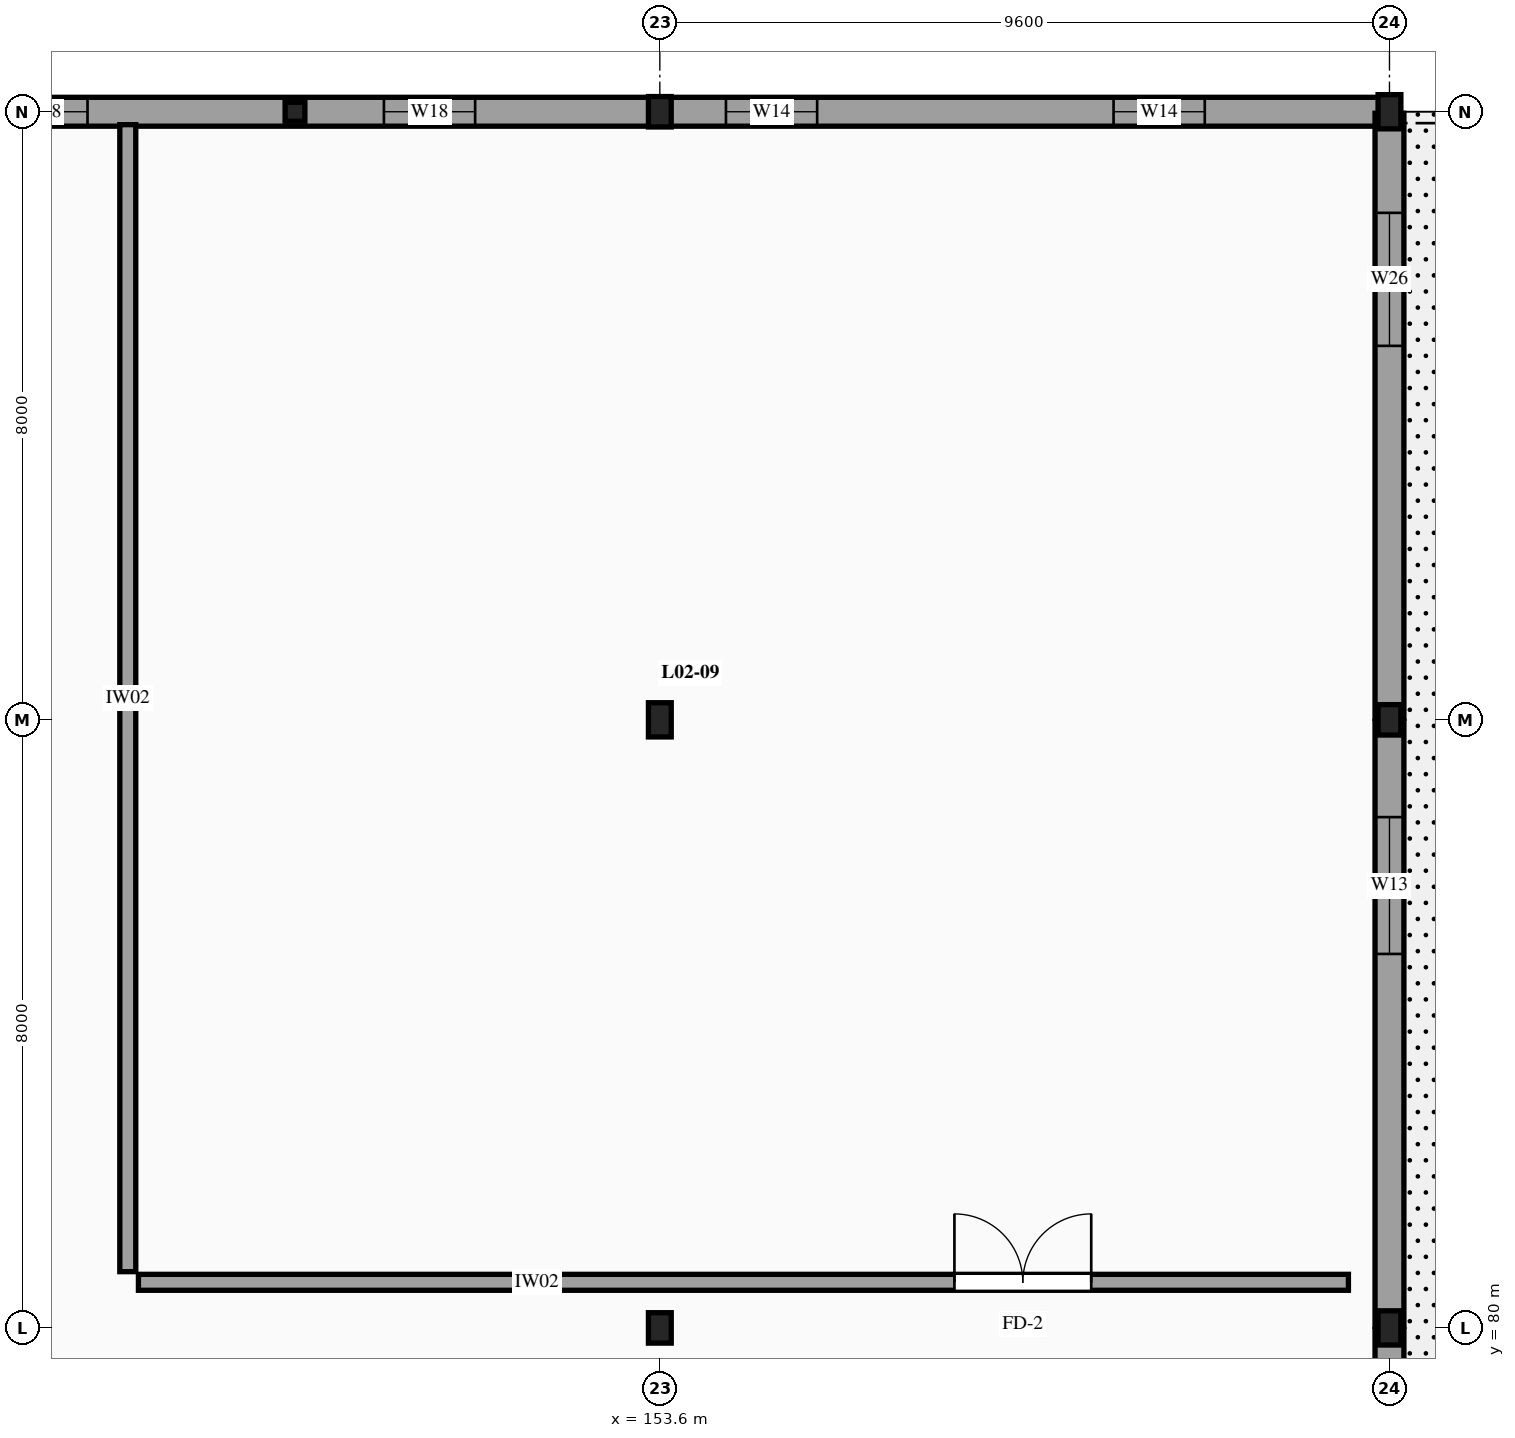
"""IFC4 building model, lengths in metres.
Left out: names, types, materials, properties, quantities, classifications, styles, units other than length and angle.
Written with IfcOpenShell. Run it as: python <this file> out.ifc"""

import sys

from ifc_helpers import new_model, si_unit, direction, frame, frame_2d, origin, origin_2d, place, context, subcontext, project, spatial, rectangle, i_section, extrude, element, fill, save


model = new_model("IFC4")
c1 = context("Model", 3, precision=1e-05, world=origin(), true_north=direction((0.0, 1.0)))
c2 = subcontext(c1, "Body", "Model", "MODEL_VIEW")
j1 = project(units=[si_unit("LENGTHUNIT", "METRE"), si_unit("PLANEANGLEUNIT", "RADIAN")], contexts=[c1])
p1 = place(None, origin())
s1 = spatial("IfcSite", under=j1, at=p1, CompositionType="ELEMENT")
p2 = place(p1, origin())
s2 = spatial("IfcBuilding", under=s1, at=p2, CompositionType="ELEMENT")
p3 = place(p2, frame((0.0, 0.0, 8.7)))
s3 = spatial("IfcBuildingStorey", under=s2, at=p3, CompositionType="ELEMENT", Elevation=8.7)
p4 = place(p3, frame((153.6, 80.0, -0.26), z_axis=(0.0, 0.0, 1.0), x_axis=(1.0, 0.0, 0.0)))
e1 = element("IfcColumn", 1, at=p4, inside=s3, PredefinedType="COLUMN", context=c2, shape_type="SweptSolid", body=[
    extrude(i_section(OverallWidth=0.3, OverallDepth=0.4, WebThickness=0.013, FlangeThickness=0.024, FilletRadius=0.027, at=origin_2d()), origin(), (0.0, 0.0, 1.0), 4.2),
])
p5 = place(p3, frame((153.6, 88.0, -0.26), z_axis=(0.0, 0.0, 1.0), x_axis=(1.0, 0.0, 0.0)))
e2 = element("IfcColumn", 2, at=p5, inside=s3, PredefinedType="COLUMN", context=c2, shape_type="SweptSolid", body=[
    extrude(i_section(OverallWidth=0.3, OverallDepth=0.45, WebThickness=0.014, FlangeThickness=0.026, FilletRadius=0.027, at=origin_2d()), origin(), (0.0, 0.0, 1.0), 4.2),
])
p6 = place(p3, frame((153.6, 96.0, -0.26), z_axis=(0.0, 0.0, 1.0), x_axis=(1.0, 0.0, 0.0)))
e3 = element("IfcColumn", 3, at=p6, inside=s3, PredefinedType="COLUMN", context=c2, shape_type="SweptSolid", body=[
    extrude(i_section(OverallWidth=0.3, OverallDepth=0.4, WebThickness=0.013, FlangeThickness=0.024, FilletRadius=0.027, at=origin_2d()), origin(), (0.0, 0.0, 1.0), 4.2),
])
p7 = place(p3, frame((163.2, 80.0, -0.26), z_axis=(0.0, 0.0, 1.0), x_axis=(1.0, 0.0, 0.0)))
e4 = element("IfcColumn", 4, at=p7, inside=s3, PredefinedType="COLUMN", context=c2, shape_type="SweptSolid", body=[
    extrude(i_section(OverallWidth=0.3, OverallDepth=0.45, WebThickness=0.014, FlangeThickness=0.026, FilletRadius=0.027, at=origin_2d()), origin(), (0.0, 0.0, 1.0), 4.2),
])
p8 = place(p3, frame((163.2, 88.0, -0.26), z_axis=(0.0, 0.0, 1.0), x_axis=(1.0, 0.0, 0.0)))
e5 = element("IfcColumn", 5, at=p8, inside=s3, PredefinedType="COLUMN", context=c2, shape_type="SweptSolid", body=[
    extrude(i_section(OverallWidth=0.3, OverallDepth=0.4, WebThickness=0.013, FlangeThickness=0.024, FilletRadius=0.027, at=origin_2d()), origin(), (0.0, 0.0, 1.0), 4.2),
])
p9 = place(p3, frame((163.2, 96.0, -0.26), z_axis=(0.0, 0.0, 1.0), x_axis=(1.0, 0.0, 0.0)))
e6 = element("IfcColumn", 6, at=p9, inside=s3, PredefinedType="COLUMN", context=c2, shape_type="SweptSolid", body=[
    extrude(i_section(OverallWidth=0.3, OverallDepth=0.45, WebThickness=0.014, FlangeThickness=0.026, FilletRadius=0.027, at=origin_2d()), origin(), (0.0, 0.0, 1.0), 4.2),
])
p10 = place(p3, frame((148.8, 96.0, -0.26), z_axis=(0.0, 0.0, 1.0), x_axis=(1.0, 0.0, 0.0)))
e7 = element("IfcColumn", 7, at=p10, inside=s3, PredefinedType="PILASTER", context=c2, shape_type="SweptSolid", body=[
    extrude(i_section(OverallWidth=0.26, OverallDepth=0.25, WebThickness=0.008, FlangeThickness=0.012, FilletRadius=0.024, at=origin_2d()), origin(), (0.0, 0.0, 1.0), 4.2),
])
p11 = place(p3, frame((144.02, 96.0, 0.0), z_axis=(0.0, 0.0, 1.0), x_axis=(1.0, 0.0, 0.0)))
e8 = element("IfcWall", 8, at=p11, inside=s3, PredefinedType="SOLIDWALL", context=c2, shape_type="SweptSolid", body=[
    extrude(rectangle(XDim=9.56, YDim=0.38, at=frame_2d((4.78, 0.0))), origin(), (0.0, 0.0, 1.0), 3.36),
])
p12 = place(p11, frame((0.85, 0.0, 0.85)))
e9 = element("IfcOpeningElement", 9, at=p12, cuts=e8, PredefinedType="OPENING", context=c2, shape_type="SweptSolid", body=[
    extrude(rectangle(XDim=1.2, YDim=2.0, at=frame_2d((0.6, 1.0))), frame((0.0, 0.2, 0.0), z_axis=(0.0, -1.0, 0.0), x_axis=(1.0, 0.0, 0.0)), (0.0, 0.0, 1.0), 0.4),
])
p13 = place(p11, frame((5.95, 0.0, 0.85)))
e10 = element("IfcOpeningElement", 10, at=p13, cuts=e8, PredefinedType="OPENING", context=c2, shape_type="SweptSolid", body=[
    extrude(rectangle(XDim=1.2, YDim=2.0, at=frame_2d((0.6, 1.0))), frame((0.0, 0.2, 0.0), z_axis=(0.0, -1.0, 0.0), x_axis=(1.0, 0.0, 0.0)), (0.0, 0.0, 1.0), 0.4),
])
p14 = place(p3, frame((153.62, 96.0, 0.0), z_axis=(0.0, 0.0, 1.0), x_axis=(1.0, 0.0, 0.0)))
e11 = element("IfcWall", 11, at=p14, inside=s3, PredefinedType="SOLIDWALL", context=c2, shape_type="SweptSolid", body=[
    extrude(rectangle(XDim=9.56, YDim=0.38, at=frame_2d((4.78, 0.0))), origin(), (0.0, 0.0, 1.0), 3.36),
])
p15 = place(p14, frame((0.85, 0.0, 0.85)))
e12 = element("IfcOpeningElement", 12, at=p15, cuts=e11, PredefinedType="OPENING", context=c2, shape_type="SweptSolid", body=[
    extrude(rectangle(XDim=1.2, YDim=1.8, at=frame_2d((0.6, 0.9))), frame((0.0, 0.2, 0.0), z_axis=(0.0, -1.0, 0.0), x_axis=(1.0, 0.0, 0.0)), (0.0, 0.0, 1.0), 0.4),
])
p16 = place(p14, frame((5.95, 0.0, 0.85)))
e13 = element("IfcOpeningElement", 13, at=p16, cuts=e11, PredefinedType="OPENING", context=c2, shape_type="SweptSolid", body=[
    extrude(rectangle(XDim=1.2, YDim=1.8, at=frame_2d((0.6, 0.9))), frame((0.0, 0.2, 0.0), z_axis=(0.0, -1.0, 0.0), x_axis=(1.0, 0.0, 0.0)), (0.0, 0.0, 1.0), 0.4),
])
p17 = place(p3, frame((163.2, 72.02, 0.0), z_axis=(0.0, 0.0, 1.0), x_axis=(0.0, 1.0, 0.0)))
e14 = element("IfcWall", 14, at=p17, inside=s3, PredefinedType="SOLIDWALL", context=c2, shape_type="SweptSolid", body=[
    extrude(rectangle(XDim=7.96, YDim=0.38, at=frame_2d((3.98, 0.0))), origin(), (0.0, 0.0, 1.0), 3.36),
])
p18 = place(p17, frame((2.8, 0.0, 0.0)))
e15 = element("IfcOpeningElement", 15, at=p18, cuts=e14, PredefinedType="OPENING", context=c2, shape_type="SweptSolid", body=[
    extrude(rectangle(XDim=1.35, YDim=2.2, at=frame_2d((0.675, 1.1))), frame((0.0, 0.2, 0.0), z_axis=(0.0, -1.0, 0.0), x_axis=(1.0, 0.0, 0.0)), (0.0, 0.0, 1.0), 0.4),
])
p19 = place(p3, frame((163.2, 80.02, 0.0), z_axis=(0.0, 0.0, 1.0), x_axis=(0.0, 1.0, 0.0)))
e16 = element("IfcWall", 16, at=p19, inside=s3, PredefinedType="SOLIDWALL", context=c2, shape_type="SweptSolid", body=[
    extrude(rectangle(XDim=7.96, YDim=0.38, at=frame_2d((3.98, 0.0))), origin(), (0.0, 0.0, 1.0), 3.36),
])
p20 = place(p19, frame((4.9, 0.0, 0.72)))
e17 = element("IfcOpeningElement", 17, at=p20, cuts=e16, PredefinedType="OPENING", context=c2, shape_type="SweptSolid", body=[
    extrude(rectangle(XDim=1.8, YDim=1.6, at=frame_2d((0.9, 0.8))), frame((0.0, 0.2, 0.0), z_axis=(0.0, -1.0, 0.0), x_axis=(1.0, 0.0, 0.0)), (0.0, 0.0, 1.0), 0.4),
])
p21 = place(p3, frame((163.2, 88.02, 0.0), z_axis=(0.0, 0.0, 1.0), x_axis=(0.0, 1.0, 0.0)))
e18 = element("IfcWall", 18, at=p21, inside=s3, PredefinedType="SOLIDWALL", context=c2, shape_type="SweptSolid", body=[
    extrude(rectangle(XDim=7.96, YDim=0.38, at=frame_2d((3.98, 0.0))), origin(), (0.0, 0.0, 1.0), 3.36),
])
p22 = place(p21, frame((4.9, 0.0, 0.72)))
e19 = element("IfcOpeningElement", 19, at=p22, cuts=e18, PredefinedType="OPENING", context=c2, shape_type="SweptSolid", body=[
    extrude(rectangle(XDim=1.75, YDim=2.3, at=frame_2d((0.875, 1.15))), frame((0.0, 0.2, 0.0), z_axis=(0.0, -1.0, 0.0), x_axis=(1.0, 0.0, 0.0)), (0.0, 0.0, 1.0), 0.4),
])
p23 = place(p3, frame((146.74, 80.6, 0.0), z_axis=(0.0, 0.0, 1.0), x_axis=(1.0, 0.0, 0.0)))
e20 = element("IfcWall", 20, at=p23, inside=s3, PredefinedType="SOLIDWALL", context=c2, shape_type="SweptSolid", body=[
    extrude(rectangle(XDim=15.92, YDim=0.21, at=frame_2d((7.96, 0.0))), origin(), (0.0, 0.0, 1.0), 3.1),
])
p24 = place(p23, frame((10.736, 0.0, 0.0)))
e21 = element("IfcOpeningElement", 21, at=p24, cuts=e20, PredefinedType="OPENING", context=c2, shape_type="SweptSolid", body=[
    extrude(rectangle(XDim=1.8, YDim=2.4, at=frame_2d((0.9, 1.2))), frame((0.0, 0.115, 0.0), z_axis=(0.0, -1.0, 0.0), x_axis=(1.0, 0.0, 0.0)), (0.0, 0.0, 1.0), 0.23),
])
p25 = place(p3, frame((146.6, 80.74, 0.0), z_axis=(0.0, 0.0, 1.0), x_axis=(0.0, 1.0, 0.0)))
e22 = element("IfcWall", 22, at=p25, inside=s3, PredefinedType="SOLIDWALL", context=c2, shape_type="SweptSolid", body=[
    extrude(rectangle(XDim=15.09, YDim=0.21, at=frame_2d((7.545, 0.0))), origin(), (0.0, 0.0, 1.0), 3.1),
])
p26 = place(p12, origin())
e23 = element("IfcWindow", 23, at=p26, inside=s3, PartitioningType="SINGLE_PANEL", PredefinedType="WINDOW", context=c2, shape_type="SweptSolid", body=[
    extrude(rectangle(XDim=1.2, YDim=2.0, at=frame_2d((0.6, 1.0))), frame((0.0, 0.03, 0.0), z_axis=(0.0, -1.0, 0.0), x_axis=(1.0, 0.0, 0.0)), (0.0, 0.0, 1.0), 0.06),
])
fill(e9, e23)
p27 = place(p13, origin())
e24 = element("IfcWindow", 24, at=p27, inside=s3, PartitioningType="SINGLE_PANEL", PredefinedType="WINDOW", context=c2, shape_type="SweptSolid", body=[
    extrude(rectangle(XDim=1.2, YDim=2.0, at=frame_2d((0.6, 1.0))), frame((0.0, 0.03, 0.0), z_axis=(0.0, -1.0, 0.0), x_axis=(1.0, 0.0, 0.0)), (0.0, 0.0, 1.0), 0.06),
])
fill(e10, e24)
p28 = place(p15, origin())
e25 = element("IfcWindow", 25, at=p28, inside=s3, PartitioningType="SINGLE_PANEL", PredefinedType="WINDOW", context=c2, shape_type="SweptSolid", body=[
    extrude(rectangle(XDim=1.2, YDim=1.8, at=frame_2d((0.6, 0.9))), frame((0.0, 0.03, 0.0), z_axis=(0.0, -1.0, 0.0), x_axis=(1.0, 0.0, 0.0)), (0.0, 0.0, 1.0), 0.06),
])
fill(e12, e25)
p29 = place(p16, origin())
e26 = element("IfcWindow", 26, at=p29, inside=s3, PartitioningType="SINGLE_PANEL", PredefinedType="WINDOW", context=c2, shape_type="SweptSolid", body=[
    extrude(rectangle(XDim=1.2, YDim=1.8, at=frame_2d((0.6, 0.9))), frame((0.0, 0.03, 0.0), z_axis=(0.0, -1.0, 0.0), x_axis=(1.0, 0.0, 0.0)), (0.0, 0.0, 1.0), 0.06),
])
fill(e13, e26)
p30 = place(p20, origin())
e27 = element("IfcWindow", 27, at=p30, inside=s3, PartitioningType="SINGLE_PANEL", PredefinedType="WINDOW", context=c2, shape_type="SweptSolid", body=[
    extrude(rectangle(XDim=1.8, YDim=1.6, at=frame_2d((0.9, 0.8))), frame((0.0, 0.03, 0.0), z_axis=(0.0, -1.0, 0.0), x_axis=(1.0, 0.0, 0.0)), (0.0, 0.0, 1.0), 0.06),
])
fill(e17, e27)
p31 = place(p22, origin())
e28 = element("IfcWindow", 28, at=p31, inside=s3, PartitioningType="SINGLE_PANEL", PredefinedType="WINDOW", context=c2, shape_type="SweptSolid", body=[
    extrude(rectangle(XDim=1.75, YDim=2.3, at=frame_2d((0.875, 1.15))), frame((0.0, 0.03, 0.0), z_axis=(0.0, -1.0, 0.0), x_axis=(1.0, 0.0, 0.0)), (0.0, 0.0, 1.0), 0.06),
])
fill(e19, e28)
p32 = place(p24, origin())
e29 = element("IfcDoor", 29, at=p32, inside=s3, OperationType="DOUBLE_DOOR_SINGLE_SWING", PredefinedType="DOOR", context=c2, shape_type="SweptSolid", body=[
    extrude(rectangle(XDim=1.8, YDim=2.4, at=frame_2d((0.9, 1.2))), frame((0.0, 0.025, 0.0), z_axis=(0.0, -1.0, 0.0), x_axis=(1.0, 0.0, 0.0)), (0.0, 0.0, 1.0), 0.05),
])
fill(e21, e29)
save(model, sys.argv[1])
